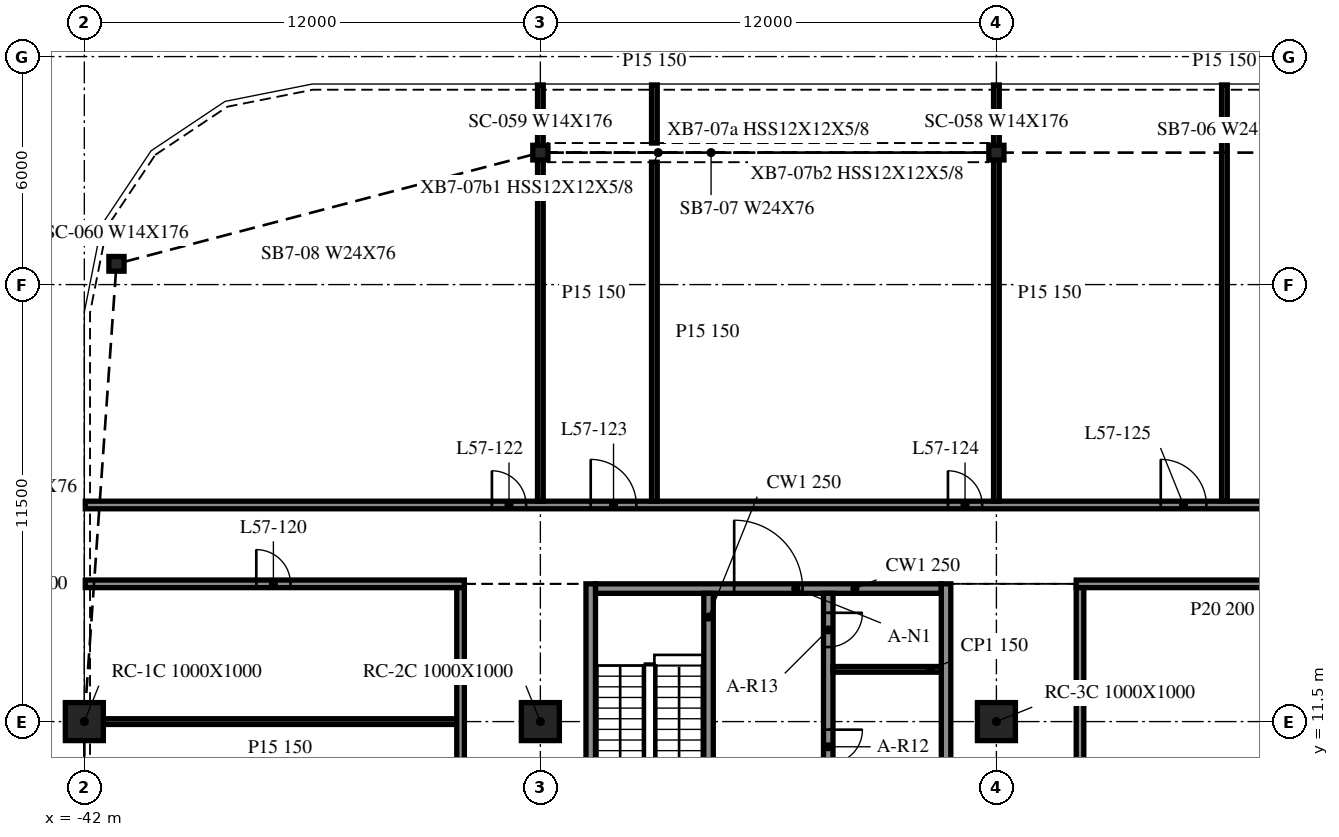
"""IFC4 building model, lengths in metres.
Left out: names, types, materials, properties, quantities, classifications, styles, units other than length and angle.
Written with IfcOpenShell. Run it as: python <this file> out.ifc"""

import sys

from ifc_helpers import new_model, si_unit, direction, frame, frame_2d, origin, origin_2d, place, context, subcontext, project, spatial, rectangle, i_section, extrude, element, fill, save


model = new_model("IFC4")
c1 = context("Model", 3, precision=1e-05, world=origin(), true_north=direction((0.0, 1.0)))
c2 = subcontext(c1, "Body", "Model", "MODEL_VIEW")
j1 = project(units=[si_unit("LENGTHUNIT", "METRE"), si_unit("PLANEANGLEUNIT", "RADIAN")], contexts=[c1])
p1 = place(None, origin())
s1 = spatial("IfcSite", under=j1, at=p1, CompositionType="ELEMENT")
p2 = place(p1, origin())
s2 = spatial("IfcBuilding", under=s1, at=p2, CompositionType="ELEMENT")
p3 = place(p2, frame((0.0, 0.0, 236.2)))
s3 = spatial("IfcBuildingStorey", under=s2, at=p3, CompositionType="ELEMENT", Elevation=236.2)
for number, where, z_axis, x_axis in (
    (1, (-42.0, 11.5, -0.34), (0.0, 0.0, 1.0), (1.0, 0.0, 0.0)),
    (2, (-30.0, 11.5, -0.34), (0.0, 0.0, 1.0), (1.0, 0.0, 0.0)),
    (3, (-18.0, 11.5, -0.34), (0.0, 0.0, 1.0), (1.0, 0.0, 0.0)),
):
    element("IfcColumn", number, at=place(p3, frame(where, z_axis=z_axis, x_axis=x_axis)), inside=s3, PredefinedType="COLUMN", context=c2, shape_type="SweptSolid", body=[
        extrude(rectangle(XDim=1.0, YDim=1.0, at=origin_2d()), origin(), (0.0, 0.0, 1.0), 3.8),
    ])
for number, where, z_axis, x_axis in (
    (4, (-18.0, 26.473, -0.34), (0.0, 0.0, 1.0), (1.0, 0.0, 0.0)),
    (5, (-30.0, 26.473, -0.34), (0.0, 0.0, 1.0), (1.0, 0.0, 0.0)),
    (6, (-41.154, 23.546, -0.34), (0.0, 0.0, 1.0), (1.0, 0.0, 0.0)),
):
    element("IfcColumn", number, at=place(p3, frame(where, z_axis=z_axis, x_axis=x_axis)), inside=s3, PredefinedType="COLUMN", context=c2, shape_type="SweptSolid", body=[
        extrude(i_section(OverallWidth=0.399, OverallDepth=0.386, WebThickness=0.021, FlangeThickness=0.033, at=origin_2d()), origin(), (0.0, 0.0, 1.0), 3.8),
    ])
for number, where, z_axis, x_axis in (
    (7, (-28.675, 15.125, 0.0), (0.0, 0.0, 1.0), (0.0, -1.0, 0.0)),
    (8, (-19.325, -9.125, 0.0), (0.0, 0.0, 1.0), (0.0, 1.0, 0.0)),
):
    element("IfcWall", number, at=place(p3, frame(where, z_axis=z_axis, x_axis=x_axis)), inside=s3, PredefinedType="SOLIDWALL", context=c2, shape_type="SweptSolid", body=[
        extrude(rectangle(XDim=24.25, YDim=0.25, at=frame_2d((12.125, 0.0))), origin(), (0.0, 0.0, 1.0), 3.46),
    ])
p4 = place(p3, frame((-28.55, 15.0, 0.0), z_axis=(0.0, 0.0, 1.0), x_axis=(1.0, 0.0, 0.0)))
e9 = element("IfcWall", 9, at=p4, inside=s3, PredefinedType="SOLIDWALL", context=c2, shape_type="SweptSolid", body=[
    extrude(rectangle(XDim=9.1, YDim=0.25, at=frame_2d((4.55, 0.0))), origin(), (0.0, 0.0, 1.0), 3.46),
])
p5 = place(p4, frame((3.65, 0.0, 0.0)))
e10 = element("IfcOpeningElement", 10, at=p5, cuts=e9, PredefinedType="OPENING", context=c2, shape_type="SweptSolid", body=[
    extrude(rectangle(XDim=1.8, YDim=2.1, at=frame_2d((0.9, 1.05))), frame((0.0, 0.135, 0.0), z_axis=(0.0, -1.0, 0.0), x_axis=(1.0, 0.0, 0.0)), (0.0, 0.0, 1.0), 0.27),
])
p6 = place(p3, frame((-25.575, 14.875, 0.0), z_axis=(0.0, 0.0, 1.0), x_axis=(0.0, -1.0, 0.0)))
e11 = element("IfcWall", 11, at=p6, inside=s3, PredefinedType="SOLIDWALL", context=c2, shape_type="SweptSolid", body=[
    extrude(rectangle(XDim=6.25, YDim=0.25, at=frame_2d((3.125, 0.0))), origin(), (0.0, 0.0, 1.0), 3.46),
])
p7 = place(p6, frame((4.85, 0.0, 0.0)))
e12 = element("IfcOpeningElement", 12, at=p7, cuts=e11, PredefinedType="OPENING", context=c2, shape_type="SweptSolid", body=[
    extrude(rectangle(XDim=1.0, YDim=2.1, at=frame_2d((0.5, 1.05))), frame((0.0, 0.135, 0.0), z_axis=(0.0, -1.0, 0.0), x_axis=(1.0, 0.0, 0.0)), (0.0, 0.0, 1.0), 0.27),
])
p8 = place(p3, frame((-22.425, 14.875, 0.0), z_axis=(0.0, 0.0, 1.0), x_axis=(0.0, -1.0, 0.0)))
e13 = element("IfcWall", 13, at=p8, inside=s3, PredefinedType="SOLIDWALL", context=c2, shape_type="SweptSolid", body=[
    extrude(rectangle(XDim=23.75, YDim=0.25, at=frame_2d((11.875, 0.0))), origin(), (0.0, 0.0, 1.0), 3.46),
])
p9 = place(p8, frame((15.01, 0.0, 0.0)))
e14 = element("IfcOpeningElement", 14, at=p9, cuts=e13, PredefinedType="OPENING", context=c2, shape_type="SweptSolid", body=[
    extrude(rectangle(XDim=0.9, YDim=2.1, at=frame_2d((0.45, 1.05))), frame((0.0, 0.135, 0.0), z_axis=(0.0, -1.0, 0.0), x_axis=(1.0, 0.0, 0.0)), (0.0, 0.0, 1.0), 0.27),
])
p10 = place(p8, frame((11.371, 0.0, 0.0)))
e15 = element("IfcOpeningElement", 15, at=p10, cuts=e13, PredefinedType="OPENING", context=c2, shape_type="SweptSolid", body=[
    extrude(rectangle(XDim=0.9, YDim=2.1, at=frame_2d((0.45, 1.05))), frame((0.0, 0.135, 0.0), z_axis=(0.0, -1.0, 0.0), x_axis=(1.0, 0.0, 0.0)), (0.0, 0.0, 1.0), 0.27),
])
p11 = place(p8, frame((7.786, 0.0, 0.0)))
e16 = element("IfcOpeningElement", 16, at=p11, cuts=e13, PredefinedType="OPENING", context=c2, shape_type="SweptSolid", body=[
    extrude(rectangle(XDim=0.9, YDim=2.1, at=frame_2d((0.45, 1.05))), frame((0.0, 0.135, 0.0), z_axis=(0.0, -1.0, 0.0), x_axis=(1.0, 0.0, 0.0)), (0.0, 0.0, 1.0), 0.27),
])
p12 = place(p8, frame((22.337, 0.0, 0.0)))
e17 = element("IfcOpeningElement", 17, at=p12, cuts=e13, PredefinedType="OPENING", context=c2, shape_type="SweptSolid", body=[
    extrude(rectangle(XDim=0.9, YDim=2.1, at=frame_2d((0.45, 1.05))), frame((0.0, 0.135, 0.0), z_axis=(0.0, -1.0, 0.0), x_axis=(1.0, 0.0, 0.0)), (0.0, 0.0, 1.0), 0.27),
])
p13 = place(p8, frame((20.3, 0.0, 0.0)))
e18 = element("IfcOpeningElement", 18, at=p13, cuts=e13, PredefinedType="OPENING", context=c2, shape_type="SweptSolid", body=[
    extrude(rectangle(XDim=0.9, YDim=2.1, at=frame_2d((0.45, 1.05))), frame((0.0, 0.135, 0.0), z_axis=(0.0, -1.0, 0.0), x_axis=(1.0, 0.0, 0.0)), (0.0, 0.0, 1.0), 0.27),
])
p14 = place(p8, frame((18.262, 0.0, 0.0)))
e19 = element("IfcOpeningElement", 19, at=p14, cuts=e13, PredefinedType="OPENING", context=c2, shape_type="SweptSolid", body=[
    extrude(rectangle(XDim=0.9, YDim=2.1, at=frame_2d((0.45, 1.05))), frame((0.0, 0.135, 0.0), z_axis=(0.0, -1.0, 0.0), x_axis=(1.0, 0.0, 0.0)), (0.0, 0.0, 1.0), 0.27),
])
p15 = place(p8, frame((3.587, 0.0, 0.0)))
e20 = element("IfcOpeningElement", 20, at=p15, cuts=e13, PredefinedType="OPENING", context=c2, shape_type="SweptSolid", body=[
    extrude(rectangle(XDim=0.9, YDim=2.1, at=frame_2d((0.45, 1.05))), frame((0.0, 0.135, 0.0), z_axis=(0.0, -1.0, 0.0), x_axis=(1.0, 0.0, 0.0)), (0.0, 0.0, 1.0), 0.27),
])
p16 = place(p8, frame((0.512, 0.0, 0.0)))
e21 = element("IfcOpeningElement", 21, at=p16, cuts=e13, PredefinedType="OPENING", context=c2, shape_type="SweptSolid", body=[
    extrude(rectangle(XDim=0.9, YDim=2.1, at=frame_2d((0.45, 1.05))), frame((0.0, 0.135, 0.0), z_axis=(0.0, -1.0, 0.0), x_axis=(1.0, 0.0, 0.0)), (0.0, 0.0, 1.0), 0.27),
])
p17 = place(p3, frame((-22.3, 12.875, 0.0), z_axis=(0.0, 0.0, 1.0), x_axis=(1.0, 0.0, 0.0)))
e22 = element("IfcWall", 22, at=p17, inside=s3, PredefinedType="PARTITIONING", context=c2, shape_type="SweptSolid", body=[
    extrude(rectangle(XDim=2.85, YDim=0.15, at=frame_2d((1.425, 0.0))), origin(), (0.0, 0.0, 1.0), 3.46),
])
p18 = place(p3, frame((-41.5, 11.5, 0.0), z_axis=(0.0, 0.0, 1.0), x_axis=(1.0, 0.0, 0.0)))
e23 = element("IfcWall", 23, at=p18, inside=s3, PredefinedType="PARTITIONING", context=c2, shape_type="SweptSolid", body=[
    extrude(rectangle(XDim=9.3, YDim=0.15, at=frame_2d((4.65, 0.0))), origin(), (0.0, 0.0, 1.0), 3.46),
])
p19 = place(p3, frame((-41.975, 15.125, 0.0), z_axis=(0.0, 0.0, 1.0), x_axis=(1.0, 0.0, 0.0)))
e24 = element("IfcWall", 24, at=p19, inside=s3, PredefinedType="PARTITIONING", context=c2, shape_type="SweptSolid", body=[
    extrude(rectangle(XDim=9.975, YDim=0.2, at=frame_2d((4.988, 0.0))), origin(), (0.0, 0.0, 1.0), 3.46),
])
p20 = place(p19, frame((4.5, 0.0, 0.0)))
e25 = element("IfcOpeningElement", 25, at=p20, cuts=e24, PredefinedType="OPENING", context=c2, shape_type="SweptSolid", body=[
    extrude(rectangle(XDim=0.9, YDim=2.1, at=frame_2d((0.45, 1.05))), frame((0.0, 0.11, 0.0), z_axis=(0.0, -1.0, 0.0), x_axis=(1.0, 0.0, 0.0)), (0.0, 0.0, 1.0), 0.22),
])
p21 = place(p3, frame((-15.9, 15.125, 0.0), z_axis=(0.0, 0.0, 1.0), x_axis=(1.0, 0.0, 0.0)))
e26 = element("IfcWall", 26, at=p21, inside=s3, PredefinedType="PARTITIONING", context=c2, shape_type="SweptSolid", body=[
    extrude(rectangle(XDim=7.7, YDim=0.2, at=frame_2d((3.85, 0.0))), origin(), (0.0, 0.0, 1.0), 3.46),
])
p22 = place(p3, frame((-41.975, 17.2, 0.0), z_axis=(0.0, 0.0, 1.0), x_axis=(1.0, 0.0, 0.0)))
e27 = element("IfcWall", 27, at=p22, inside=s3, PredefinedType="PARTITIONING", context=c2, shape_type="SweptSolid", body=[
    extrude(rectangle(XDim=95.95, YDim=0.2, at=frame_2d((47.975, 0.0))), origin(), (0.0, 0.0, 1.0), 3.46),
])
p23 = place(p22, frame((10.7, 0.0, 0.0)))
e28 = element("IfcOpeningElement", 28, at=p23, cuts=e27, PredefinedType="OPENING", context=c2, shape_type="SweptSolid", body=[
    extrude(rectangle(XDim=0.9, YDim=2.1, at=frame_2d((0.45, 1.05))), frame((0.0, 0.11, 0.0), z_axis=(0.0, -1.0, 0.0), x_axis=(1.0, 0.0, 0.0)), (0.0, 0.0, 1.0), 0.22),
])
p24 = place(p22, frame((13.3, 0.0, 0.0)))
e29 = element("IfcOpeningElement", 29, at=p24, cuts=e27, PredefinedType="OPENING", context=c2, shape_type="SweptSolid", body=[
    extrude(rectangle(XDim=1.2, YDim=2.1, at=frame_2d((0.6, 1.05))), frame((0.0, 0.11, 0.0), z_axis=(0.0, -1.0, 0.0), x_axis=(1.0, 0.0, 0.0)), (0.0, 0.0, 1.0), 0.22),
])
p25 = place(p22, frame((22.7, 0.0, 0.0)))
e30 = element("IfcOpeningElement", 30, at=p25, cuts=e27, PredefinedType="OPENING", context=c2, shape_type="SweptSolid", body=[
    extrude(rectangle(XDim=0.9, YDim=2.1, at=frame_2d((0.45, 1.05))), frame((0.0, 0.11, 0.0), z_axis=(0.0, -1.0, 0.0), x_axis=(1.0, 0.0, 0.0)), (0.0, 0.0, 1.0), 0.22),
])
p26 = place(p22, frame((28.3, 0.0, 0.0)))
e31 = element("IfcOpeningElement", 31, at=p26, cuts=e27, PredefinedType="OPENING", context=c2, shape_type="SweptSolid", body=[
    extrude(rectangle(XDim=1.2, YDim=2.1, at=frame_2d((0.6, 1.05))), frame((0.0, 0.11, 0.0), z_axis=(0.0, -1.0, 0.0), x_axis=(1.0, 0.0, 0.0)), (0.0, 0.0, 1.0), 0.22),
])
p27 = place(p22, frame((40.3, 0.0, 0.0)))
e32 = element("IfcOpeningElement", 32, at=p27, cuts=e27, PredefinedType="OPENING", context=c2, shape_type="SweptSolid", body=[
    extrude(rectangle(XDim=1.2, YDim=2.1, at=frame_2d((0.6, 1.05))), frame((0.0, 0.11, 0.0), z_axis=(0.0, -1.0, 0.0), x_axis=(1.0, 0.0, 0.0)), (0.0, 0.0, 1.0), 0.22),
])
p28 = place(p22, frame((43.7, 0.0, 0.0)))
e33 = element("IfcOpeningElement", 33, at=p28, cuts=e27, PredefinedType="OPENING", context=c2, shape_type="SweptSolid", body=[
    extrude(rectangle(XDim=0.9, YDim=2.1, at=frame_2d((0.45, 1.05))), frame((0.0, 0.11, 0.0), z_axis=(0.0, -1.0, 0.0), x_axis=(1.0, 0.0, 0.0)), (0.0, 0.0, 1.0), 0.22),
])
p29 = place(p22, frame((47.3, 0.0, 0.0)))
e34 = element("IfcOpeningElement", 34, at=p29, cuts=e27, PredefinedType="OPENING", context=c2, shape_type="SweptSolid", body=[
    extrude(rectangle(XDim=1.2, YDim=2.1, at=frame_2d((0.6, 1.05))), frame((0.0, 0.11, 0.0), z_axis=(0.0, -1.0, 0.0), x_axis=(1.0, 0.0, 0.0)), (0.0, 0.0, 1.0), 0.22),
])
p30 = place(p22, frame((54.1, 0.0, 0.0)))
e35 = element("IfcOpeningElement", 35, at=p30, cuts=e27, PredefinedType="OPENING", context=c2, shape_type="SweptSolid", body=[
    extrude(rectangle(XDim=0.9, YDim=2.1, at=frame_2d((0.45, 1.05))), frame((0.0, 0.11, 0.0), z_axis=(0.0, -1.0, 0.0), x_axis=(1.0, 0.0, 0.0)), (0.0, 0.0, 1.0), 0.22),
])
p31 = place(p22, frame((60.1, 0.0, 0.0)))
e36 = element("IfcOpeningElement", 36, at=p31, cuts=e27, PredefinedType="OPENING", context=c2, shape_type="SweptSolid", body=[
    extrude(rectangle(XDim=1.2, YDim=2.1, at=frame_2d((0.6, 1.05))), frame((0.0, 0.11, 0.0), z_axis=(0.0, -1.0, 0.0), x_axis=(1.0, 0.0, 0.0)), (0.0, 0.0, 1.0), 0.22),
])
p32 = place(p22, frame((72.1, 0.0, 0.0)))
e37 = element("IfcOpeningElement", 37, at=p32, cuts=e27, PredefinedType="OPENING", context=c2, shape_type="SweptSolid", body=[
    extrude(rectangle(XDim=1.2, YDim=2.1, at=frame_2d((0.6, 1.05))), frame((0.0, 0.11, 0.0), z_axis=(0.0, -1.0, 0.0), x_axis=(1.0, 0.0, 0.0)), (0.0, 0.0, 1.0), 0.22),
])
p33 = place(p22, frame((75.1, 0.0, 0.0)))
e38 = element("IfcOpeningElement", 38, at=p33, cuts=e27, PredefinedType="OPENING", context=c2, shape_type="SweptSolid", body=[
    extrude(rectangle(XDim=0.9, YDim=2.1, at=frame_2d((0.45, 1.05))), frame((0.0, 0.11, 0.0), z_axis=(0.0, -1.0, 0.0), x_axis=(1.0, 0.0, 0.0)), (0.0, 0.0, 1.0), 0.22),
])
p34 = place(p22, frame((84.1, 0.0, 0.0)))
e39 = element("IfcOpeningElement", 39, at=p34, cuts=e27, PredefinedType="OPENING", context=c2, shape_type="SweptSolid", body=[
    extrude(rectangle(XDim=1.2, YDim=2.1, at=frame_2d((0.6, 1.05))), frame((0.0, 0.11, 0.0), z_axis=(0.0, -1.0, 0.0), x_axis=(1.0, 0.0, 0.0)), (0.0, 0.0, 1.0), 0.22),
])
p35 = place(p22, frame((90.1, 0.0, 0.0)))
e40 = element("IfcOpeningElement", 40, at=p35, cuts=e27, PredefinedType="OPENING", context=c2, shape_type="SweptSolid", body=[
    extrude(rectangle(XDim=0.9, YDim=2.1, at=frame_2d((0.45, 1.05))), frame((0.0, 0.11, 0.0), z_axis=(0.0, -1.0, 0.0), x_axis=(1.0, 0.0, 0.0)), (0.0, 0.0, 1.0), 0.22),
])
p36 = place(p3, frame((-32.1, -9.025, 0.0), z_axis=(0.0, 0.0, 1.0), x_axis=(0.0, 1.0, 0.0)))
e41 = element("IfcWall", 41, at=p36, inside=s3, PredefinedType="PARTITIONING", context=c2, shape_type="SweptSolid", body=[
    extrude(rectangle(XDim=24.05, YDim=0.2, at=frame_2d((12.025, 0.0))), origin(), (0.0, 0.0, 1.0), 3.46),
])
p37 = place(p36, frame((11.5, 0.0, 0.0)))
e42 = element("IfcOpeningElement", 42, at=p37, cuts=e41, PredefinedType="OPENING", context=c2, shape_type="SweptSolid", body=[
    extrude(rectangle(XDim=1.0, YDim=2.1, at=frame_2d((0.5, 1.05))), frame((0.0, 0.11, 0.0), z_axis=(0.0, -1.0, 0.0), x_axis=(1.0, 0.0, 0.0)), (0.0, 0.0, 1.0), 0.22),
])
p38 = place(p3, frame((-30.0, 17.3, 0.0), z_axis=(0.0, 0.0, 1.0), x_axis=(0.0, 1.0, 0.0)))
e43 = element("IfcWall", 43, at=p38, inside=s3, PredefinedType="PARTITIONING", context=c2, shape_type="SweptSolid", body=[
    extrude(rectangle(XDim=10.953, YDim=0.15, at=frame_2d((5.477, 0.0))), origin(), (0.0, 0.0, 1.0), 3.46),
])
p39 = place(p3, frame((-27.0, 17.3, 0.0), z_axis=(0.0, 0.0, 1.0), x_axis=(0.0, 1.0, 0.0)))
e44 = element("IfcWall", 44, at=p39, inside=s3, PredefinedType="PARTITIONING", context=c2, shape_type="SweptSolid", body=[
    extrude(rectangle(XDim=8.921, YDim=0.15, at=frame_2d((4.46, 0.0))), origin(), (0.0, 0.0, 1.0), 3.46),
])
p40 = place(p3, frame((-27.0, 26.725, 0.0), z_axis=(0.0, 0.0, 1.0), x_axis=(0.0, 1.0, 0.0)))
e45 = element("IfcWall", 45, at=p40, inside=s3, PredefinedType="PARTITIONING", context=c2, shape_type="SweptSolid", body=[
    extrude(rectangle(XDim=1.528, YDim=0.15, at=frame_2d((0.764, 0.0))), origin(), (0.0, 0.0, 1.0), 3.46),
])
p41 = place(p3, frame((-18.0, 17.3, 0.0), z_axis=(0.0, 0.0, 1.0), x_axis=(0.0, 1.0, 0.0)))
e46 = element("IfcWall", 46, at=p41, inside=s3, PredefinedType="PARTITIONING", context=c2, shape_type="SweptSolid", body=[
    extrude(rectangle(XDim=10.953, YDim=0.15, at=frame_2d((5.477, 0.0))), origin(), (0.0, 0.0, 1.0), 3.46),
])
p42 = place(p3, frame((-15.8, -9.025, 0.0), z_axis=(0.0, 0.0, 1.0), x_axis=(0.0, 1.0, 0.0)))
e47 = element("IfcWall", 47, at=p42, inside=s3, PredefinedType="PARTITIONING", context=c2, shape_type="SweptSolid", body=[
    extrude(rectangle(XDim=24.05, YDim=0.2, at=frame_2d((12.025, 0.0))), origin(), (0.0, 0.0, 1.0), 3.46),
])
p43 = place(p42, frame((11.5, 0.0, 0.0)))
e48 = element("IfcOpeningElement", 48, at=p43, cuts=e47, PredefinedType="OPENING", context=c2, shape_type="SweptSolid", body=[
    extrude(rectangle(XDim=0.9, YDim=2.1, at=frame_2d((0.45, 1.05))), frame((0.0, 0.11, 0.0), z_axis=(0.0, -1.0, 0.0), x_axis=(1.0, 0.0, 0.0)), (0.0, 0.0, 1.0), 0.22),
])
p44 = place(p3, frame((-12.0, 17.3, 0.0), z_axis=(0.0, 0.0, 1.0), x_axis=(0.0, 1.0, 0.0)))
e49 = element("IfcWall", 49, at=p44, inside=s3, PredefinedType="PARTITIONING", context=c2, shape_type="SweptSolid", body=[
    extrude(rectangle(XDim=10.953, YDim=0.15, at=frame_2d((5.477, 0.0))), origin(), (0.0, 0.0, 1.0), 3.46),
])
p45 = place(p5, origin())
e50 = element("IfcDoor", 50, at=p45, inside=s3, OperationType="DOUBLE_DOOR_SINGLE_SWING", PredefinedType="DOOR", context=c2, shape_type="SweptSolid", body=[
    extrude(rectangle(XDim=1.8, YDim=2.1, at=frame_2d((0.9, 1.05))), frame((0.0, 0.025, 0.0), z_axis=(0.0, -1.0, 0.0), x_axis=(1.0, 0.0, 0.0)), (0.0, 0.0, 1.0), 0.05),
])
fill(e10, e50)
p46 = place(p15, origin())
e51 = element("IfcDoor", 51, at=p46, inside=s3, OperationType="SINGLE_SWING_RIGHT", PredefinedType="DOOR", context=c2, shape_type="SweptSolid", body=[
    extrude(rectangle(XDim=0.9, YDim=2.1, at=frame_2d((0.45, 1.05))), frame((0.0, 0.025, 0.0), z_axis=(0.0, -1.0, 0.0), x_axis=(1.0, 0.0, 0.0)), (0.0, 0.0, 1.0), 0.05),
])
fill(e20, e51)
p47 = place(p16, origin())
e52 = element("IfcDoor", 52, at=p47, inside=s3, OperationType="SINGLE_SWING_LEFT", PredefinedType="DOOR", context=c2, shape_type="SweptSolid", body=[
    extrude(rectangle(XDim=0.9, YDim=2.1, at=frame_2d((0.45, 1.05))), frame((0.0, 0.025, 0.0), z_axis=(0.0, -1.0, 0.0), x_axis=(1.0, 0.0, 0.0)), (0.0, 0.0, 1.0), 0.05),
])
fill(e21, e52)
p48 = place(p20, origin())
e53 = element("IfcDoor", 53, at=p48, inside=s3, OperationType="SINGLE_SWING_LEFT", PredefinedType="DOOR", context=c2, shape_type="SweptSolid", body=[
    extrude(rectangle(XDim=0.9, YDim=2.1, at=frame_2d((0.45, 1.05))), frame((0.0, 0.025, 0.0), z_axis=(0.0, -1.0, 0.0), x_axis=(1.0, 0.0, 0.0)), (0.0, 0.0, 1.0), 0.05),
])
fill(e25, e53)
p49 = place(p23, origin())
e54 = element("IfcDoor", 54, at=p49, inside=s3, OperationType="SINGLE_SWING_LEFT", PredefinedType="DOOR", context=c2, shape_type="SweptSolid", body=[
    extrude(rectangle(XDim=0.9, YDim=2.1, at=frame_2d((0.45, 1.05))), frame((0.0, 0.025, 0.0), z_axis=(0.0, -1.0, 0.0), x_axis=(1.0, 0.0, 0.0)), (0.0, 0.0, 1.0), 0.05),
])
fill(e28, e54)
p50 = place(p24, origin())
e55 = element("IfcDoor", 55, at=p50, inside=s3, OperationType="SINGLE_SWING_LEFT", PredefinedType="DOOR", context=c2, shape_type="SweptSolid", body=[
    extrude(rectangle(XDim=1.2, YDim=2.1, at=frame_2d((0.6, 1.05))), frame((0.0, 0.025, 0.0), z_axis=(0.0, -1.0, 0.0), x_axis=(1.0, 0.0, 0.0)), (0.0, 0.0, 1.0), 0.05),
])
fill(e29, e55)
p51 = place(p25, origin())
e56 = element("IfcDoor", 56, at=p51, inside=s3, OperationType="SINGLE_SWING_LEFT", PredefinedType="DOOR", context=c2, shape_type="SweptSolid", body=[
    extrude(rectangle(XDim=0.9, YDim=2.1, at=frame_2d((0.45, 1.05))), frame((0.0, 0.025, 0.0), z_axis=(0.0, -1.0, 0.0), x_axis=(1.0, 0.0, 0.0)), (0.0, 0.0, 1.0), 0.05),
])
fill(e30, e56)
p52 = place(p26, origin())
e57 = element("IfcDoor", 57, at=p52, inside=s3, OperationType="SINGLE_SWING_LEFT", PredefinedType="DOOR", context=c2, shape_type="SweptSolid", body=[
    extrude(rectangle(XDim=1.2, YDim=2.1, at=frame_2d((0.6, 1.05))), frame((0.0, 0.025, 0.0), z_axis=(0.0, -1.0, 0.0), x_axis=(1.0, 0.0, 0.0)), (0.0, 0.0, 1.0), 0.05),
])
fill(e31, e57)
save(model, sys.argv[1])
